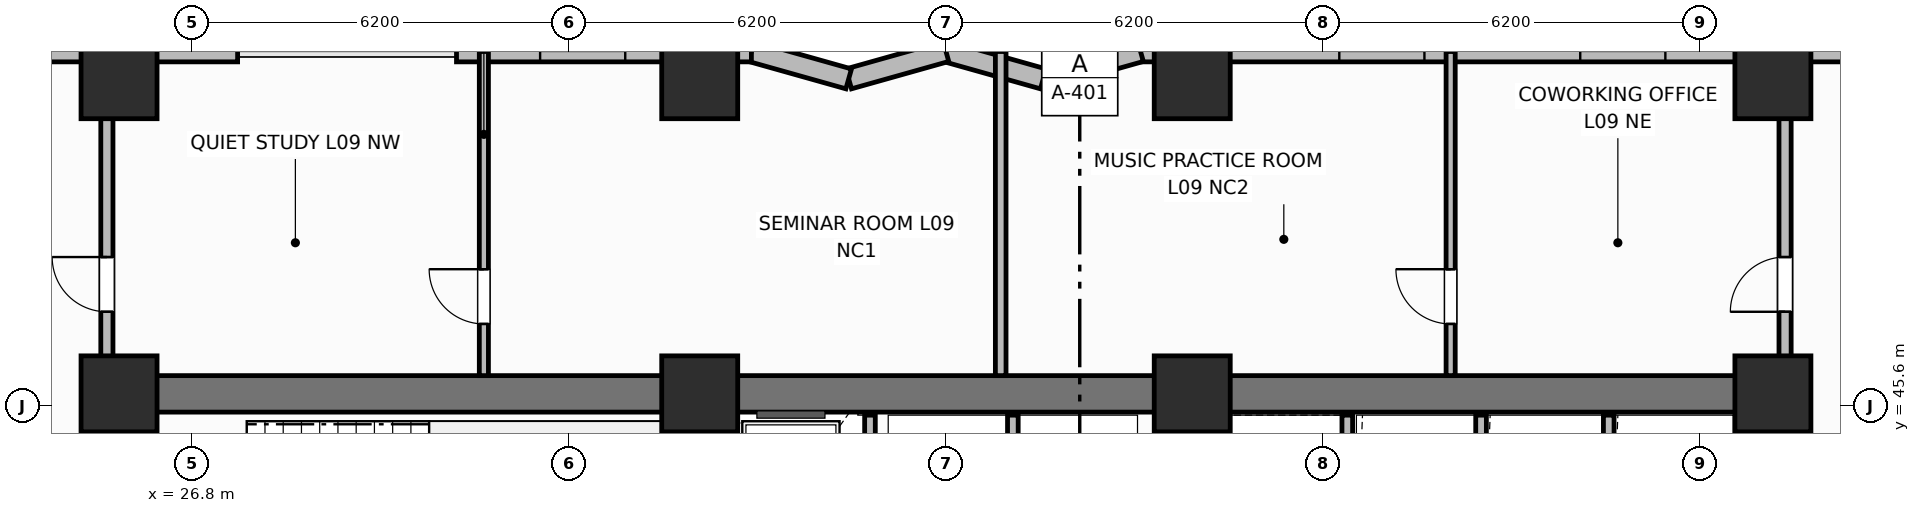
"""IFC4 building model, lengths in metres.
Left out: names, types, materials, properties, quantities, classifications, styles, units other than length and angle.
Written with IfcOpenShell. Run it as: python <this file> out.ifc"""

import sys

from ifc_helpers import new_model, si_unit, direction, frame, frame_2d, origin, origin_2d, place, context, subcontext, project, spatial, rectangle, extrude, element, fill, save


model = new_model("IFC4")
c1 = context("Model", 3, precision=1e-05, world=origin(), true_north=direction((0.0, 1.0)))
c2 = subcontext(c1, "Body", "Model", "MODEL_VIEW")
j1 = project(units=[si_unit("LENGTHUNIT", "METRE"), si_unit("PLANEANGLEUNIT", "RADIAN")], contexts=[c1])
p1 = place(None, origin())
s1 = spatial("IfcSite", under=j1, at=p1, CompositionType="ELEMENT")
p2 = place(p1, origin())
s2 = spatial("IfcBuilding", under=s1, at=p2, CompositionType="ELEMENT")
p3 = place(p2, frame((0.0, 0.0, 39.9)))
s3 = spatial("IfcBuildingStorey", under=s2, at=p3, CompositionType="ELEMENT", Elevation=39.9)
p4 = place(p3, frame((25.6, 45.8, 0.0), z_axis=(0.0, 0.0, 1.0), x_axis=(1.0, 0.0, 0.0)))
e1 = element("IfcWall", 1, at=p4, inside=s3, PredefinedType="SHEAR", context=c2, shape_type="SweptSolid", body=[
    extrude(rectangle(XDim=27.2, YDim=0.6, at=frame_2d((13.6, 0.0))), origin(), (0.0, 0.0, 1.0), 3.7),
])
for number, where, z_axis, x_axis in (
    (2, (25.6, 39.9, 0.0), (0.0, 0.0, 1.0), (0.0, 1.0, 0.0)),
    (3, (52.8, 39.9, 0.0), (0.0, 0.0, 1.0), (0.0, 1.0, 0.0)),
):
    element("IfcWall", number, at=place(p3, frame(where, z_axis=z_axis, x_axis=x_axis)), inside=s3, PredefinedType="SHEAR", context=c2, shape_type="SweptSolid", body=[
        extrude(rectangle(XDim=5.6, YDim=0.6, at=frame_2d((2.8, 0.0))), origin(), (0.0, 0.0, 1.0), 3.7),
    ])
for number, where, z_axis, x_axis in (
    (4, (35.15, 39.9, 0.0), (0.0, 0.0, 1.0), (0.0, 1.0, 0.0)),
    (5, (43.25, 39.9, 0.0), (0.0, 0.0, 1.0), (0.0, 1.0, 0.0)),
):
    element("IfcWall", number, at=place(p3, frame(where, z_axis=z_axis, x_axis=x_axis)), inside=s3, PredefinedType="SHEAR", context=c2, shape_type="SweptSolid", body=[
        extrude(rectangle(XDim=5.6, YDim=0.4, at=frame_2d((2.8, 0.0))), origin(), (0.0, 0.0, 1.0), 3.7),
    ])
for number, where, z_axis, x_axis in (
    (6, (25.6, 45.8, 0.0), (0.0, 0.0, 1.0), (1.0, 0.0, 0.0)),
    (7, (35.15, 45.8, 0.0), (0.0, 0.0, 1.0), (1.0, 0.0, 0.0)),
    (8, (43.25, 45.8, 0.0), (0.0, 0.0, 1.0), (1.0, 0.0, 0.0)),
    (9, (52.8, 45.8, 0.0), (0.0, 0.0, 1.0), (1.0, 0.0, 0.0)),
    (10, (25.6, 50.95, 0.0), (0.0, 0.0, 1.0), (1.0, 0.0, 0.0)),
    (11, (35.15, 50.95, 0.0), (0.0, 0.0, 1.0), (1.0, 0.0, 0.0)),
    (12, (43.25, 50.95, 0.0), (0.0, 0.0, 1.0), (1.0, 0.0, 0.0)),
    (13, (52.8, 50.95, 0.0), (0.0, 0.0, 1.0), (1.0, 0.0, 0.0)),
):
    element("IfcColumn", number, at=place(p3, frame(where, z_axis=z_axis, x_axis=x_axis)), inside=s3, PredefinedType="COLUMN", context=c2, shape_type="SweptSolid", body=[
        extrude(rectangle(XDim=1.25, YDim=1.25, at=origin_2d()), origin(), (0.0, 0.0, 1.0), 3.7),
    ])
p5 = place(p3, frame((55.35, 51.43, 0.0), z_axis=(0.0, 0.0, 1.0), x_axis=(-1.0, 0.0, 0.0)))
e14 = element("IfcWall", 14, at=p5, inside=s3, PredefinedType="SOLIDWALL", context=c2, shape_type="SweptSolid", body=[
    extrude(rectangle(XDim=12.95, YDim=0.34, at=frame_2d((6.475, 0.0))), origin(), (0.0, 0.0, 1.0), 2.7),
])
p6 = place(p5, frame((4.319, 0.0, 0.73)))
e15 = element("IfcOpeningElement", 15, at=p6, cuts=e14, PredefinedType="OPENING", context=c2, shape_type="SweptSolid", body=[
    extrude(rectangle(XDim=1.4, YDim=1.85, at=frame_2d((0.7, 0.925))), frame((0.0, 0.18, 0.0), z_axis=(0.0, -1.0, 0.0), x_axis=(1.0, 0.0, 0.0)), (0.0, 0.0, 1.0), 0.36),
])
p7 = place(p5, frame((8.281, 0.0, 0.73)))
e16 = element("IfcOpeningElement", 16, at=p7, cuts=e14, PredefinedType="OPENING", context=c2, shape_type="SweptSolid", body=[
    extrude(rectangle(XDim=1.4, YDim=1.85, at=frame_2d((0.7, 0.925))), frame((0.0, 0.18, 0.0), z_axis=(0.0, -1.0, 0.0), x_axis=(1.0, 0.0, 0.0)), (0.0, 0.0, 1.0), 0.36),
])
p8 = place(p3, frame((42.4, 51.43, 0.0), z_axis=(0.0, 0.0, 1.0), x_axis=(-0.962652136636, -0.270741322725, 0.0)))
e17 = element("IfcWall", 17, at=p8, inside=s3, PredefinedType="SOLIDWALL", context=c2, shape_type="SweptSolid", body=[
    extrude(rectangle(XDim=1.662, YDim=0.34, at=frame_2d((0.831, 0.0))), origin(), (0.0, 0.0, 1.0), 2.7),
])
p9 = place(p3, frame((40.8, 50.98, 0.0), z_axis=(0.0, 0.0, 1.0), x_axis=(-0.962662902433, 0.270703040766, 0.0)))
e18 = element("IfcWall", 18, at=p9, inside=s3, PredefinedType="SOLIDWALL", context=c2, shape_type="SweptSolid", body=[
    extrude(rectangle(XDim=1.662, YDim=0.34, at=frame_2d((0.831, 0.0))), origin(), (0.0, 0.0, 1.0), 2.7),
])
p10 = place(p3, frame((39.2, 51.43, 0.0), z_axis=(0.0, 0.0, 1.0), x_axis=(-0.962652136636, -0.270741322725, 0.0)))
e19 = element("IfcWall", 19, at=p10, inside=s3, PredefinedType="SOLIDWALL", context=c2, shape_type="SweptSolid", body=[
    extrude(rectangle(XDim=1.662, YDim=0.34, at=frame_2d((0.831, 0.0))), origin(), (0.0, 0.0, 1.0), 2.7),
])
p11 = place(p3, frame((37.6, 50.98, 0.0), z_axis=(0.0, 0.0, 1.0), x_axis=(-0.962662902433, 0.270703040766, 0.0)))
e20 = element("IfcWall", 20, at=p11, inside=s3, PredefinedType="SOLIDWALL", context=c2, shape_type="SweptSolid", body=[
    extrude(rectangle(XDim=1.662, YDim=0.34, at=frame_2d((0.831, 0.0))), origin(), (0.0, 0.0, 1.0), 2.7),
])
p12 = place(p3, frame((36.0, 51.43, 0.0), z_axis=(0.0, 0.0, 1.0), x_axis=(-1.0, 0.0, 0.0)))
e21 = element("IfcWall", 21, at=p12, inside=s3, PredefinedType="SOLIDWALL", context=c2, shape_type="SweptSolid", body=[
    extrude(rectangle(XDim=4.85, YDim=0.34, at=frame_2d((2.425, 0.0))), origin(), (0.0, 0.0, 1.0), 2.7),
])
p13 = place(p12, frame((2.075, 0.0, 0.73)))
e22 = element("IfcOpeningElement", 22, at=p13, cuts=e21, PredefinedType="OPENING", context=c2, shape_type="SweptSolid", body=[
    extrude(rectangle(XDim=1.4, YDim=1.85, at=frame_2d((0.7, 0.925))), frame((0.0, 0.18, 0.0), z_axis=(0.0, -1.0, 0.0), x_axis=(1.0, 0.0, 0.0)), (0.0, 0.0, 1.0), 0.36),
])
p14 = place(p3, frame((27.55, 51.43, 0.0), z_axis=(0.0, 0.0, 1.0), x_axis=(-1.0, 0.0, 0.0)))
e23 = element("IfcWall", 23, at=p14, inside=s3, PredefinedType="SOLIDWALL", context=c2, shape_type="SweptSolid", body=[
    extrude(rectangle(XDim=8.95, YDim=0.34, at=frame_2d((4.475, 0.0))), origin(), (0.0, 0.0, 1.0), 2.7),
])
p15 = place(p14, frame((5.688, 0.0, 0.73)))
e24 = element("IfcOpeningElement", 24, at=p15, cuts=e23, PredefinedType="OPENING", context=c2, shape_type="SweptSolid", body=[
    extrude(rectangle(XDim=1.4, YDim=1.85, at=frame_2d((0.7, 0.925))), frame((0.0, 0.18, 0.0), z_axis=(0.0, -1.0, 0.0), x_axis=(1.0, 0.0, 0.0)), (0.0, 0.0, 1.0), 0.36),
])
p16 = place(p3, frame((37.95, 42.6, 0.0), z_axis=(0.0, 0.0, 1.0), x_axis=(0.0, 1.0, 0.0)))
e25 = element("IfcWall", 25, at=p16, inside=s3, PredefinedType="PARTITIONING", context=c2, shape_type="SweptSolid", body=[
    extrude(rectangle(XDim=2.85, YDim=0.175, at=frame_2d((1.425, 0.0))), origin(), (0.0, 0.0, 1.0), 2.53),
])
for number, where, z_axis, x_axis in (
    (26, (40.3, 42.65, 0.0), (0.0, 0.0, 1.0), (0.0, 1.0, 0.0)),
    (27, (45.8, 42.65, 0.0), (0.0, 0.0, 1.0), (0.0, 1.0, 0.0)),
    (28, (48.0, 42.65, 0.0), (0.0, 0.0, 1.0), (0.0, 1.0, 0.0)),
    (29, (50.1, 42.65, 0.0), (0.0, 0.0, 1.0), (0.0, 1.0, 0.0)),
):
    element("IfcWall", number, at=place(p3, frame(where, z_axis=z_axis, x_axis=x_axis)), inside=s3, PredefinedType="PARTITIONING", context=c2, shape_type="SweptSolid", body=[
        extrude(rectangle(XDim=2.8, YDim=0.175, at=frame_2d((1.4, 0.0))), origin(), (0.0, 0.0, 1.0), 2.53),
    ])
p17 = place(p3, frame((31.6, 46.1, 0.0), z_axis=(0.0, 0.0, 1.0), x_axis=(0.0, 1.0, 0.0)))
e30 = element("IfcWall", 30, at=p17, inside=s3, PredefinedType="PARTITIONING", context=c2, shape_type="SweptSolid", body=[
    extrude(rectangle(XDim=5.33, YDim=0.15, at=frame_2d((2.665, 0.0))), origin(), (0.0, 0.0, 1.0), 2.53),
])
p18 = place(p17, frame((0.85, 0.0, 0.0)))
e31 = element("IfcOpeningElement", 31, at=p18, cuts=e30, PredefinedType="OPENING", context=c2, shape_type="SweptSolid", body=[
    extrude(rectangle(XDim=0.9, YDim=2.1, at=frame_2d((0.45, 1.05))), frame((0.0, 0.085, 0.0), z_axis=(0.0, -1.0, 0.0), x_axis=(1.0, 0.0, 0.0)), (0.0, 0.0, 1.0), 0.17),
])
p19 = place(p3, frame((40.1, 46.1, 0.0), z_axis=(0.0, 0.0, 1.0), x_axis=(0.0, 1.0, 0.0)))
e32 = element("IfcWall", 32, at=p19, inside=s3, PredefinedType="PARTITIONING", context=c2, shape_type="SweptSolid", body=[
    extrude(rectangle(XDim=5.33, YDim=0.175, at=frame_2d((2.665, 0.0))), origin(), (0.0, 0.0, 1.0), 2.53),
])
p20 = place(p3, frame((47.5, 46.1, 0.0), z_axis=(0.0, 0.0, 1.0), x_axis=(0.0, 1.0, 0.0)))
e33 = element("IfcWall", 33, at=p20, inside=s3, PredefinedType="PARTITIONING", context=c2, shape_type="SweptSolid", body=[
    extrude(rectangle(XDim=5.33, YDim=0.15, at=frame_2d((2.665, 0.0))), origin(), (0.0, 0.0, 1.0), 2.53),
])
p21 = place(p20, frame((0.85, 0.0, 0.0)))
e34 = element("IfcOpeningElement", 34, at=p21, cuts=e33, PredefinedType="OPENING", context=c2, shape_type="SweptSolid", body=[
    extrude(rectangle(XDim=0.9, YDim=2.1, at=frame_2d((0.45, 1.05))), frame((0.0, 0.085, 0.0), z_axis=(0.0, -1.0, 0.0), x_axis=(1.0, 0.0, 0.0)), (0.0, 0.0, 1.0), 0.17),
])
p22 = place(p3, frame((25.4, 46.1, 0.0), z_axis=(0.0, 0.0, 1.0), x_axis=(0.0, 1.0, 0.0)))
e35 = element("IfcWall", 35, at=p22, inside=s3, PredefinedType="PARTITIONING", context=c2, shape_type="SweptSolid", body=[
    extrude(rectangle(XDim=4.38, YDim=0.2, at=frame_2d((2.19, 0.0))), origin(), (0.0, 0.0, 1.0), 2.53),
])
p23 = place(p22, frame((1.05, 0.0, 0.0)))
e36 = element("IfcOpeningElement", 36, at=p23, cuts=e35, PredefinedType="OPENING", context=c2, shape_type="SweptSolid", body=[
    extrude(rectangle(XDim=0.9, YDim=2.1, at=frame_2d((0.45, 1.05))), frame((0.0, 0.11, 0.0), z_axis=(0.0, -1.0, 0.0), x_axis=(1.0, 0.0, 0.0)), (0.0, 0.0, 1.0), 0.22),
])
p24 = place(p3, frame((53.0, 46.1, 0.0), z_axis=(0.0, 0.0, 1.0), x_axis=(0.0, 1.0, 0.0)))
e37 = element("IfcWall", 37, at=p24, inside=s3, PredefinedType="PARTITIONING", context=c2, shape_type="SweptSolid", body=[
    extrude(rectangle(XDim=4.38, YDim=0.2, at=frame_2d((2.19, 0.0))), origin(), (0.0, 0.0, 1.0), 2.53),
])
p25 = place(p24, frame((1.05, 0.0, 0.0)))
e38 = element("IfcOpeningElement", 38, at=p25, cuts=e37, PredefinedType="OPENING", context=c2, shape_type="SweptSolid", body=[
    extrude(rectangle(XDim=0.9, YDim=2.1, at=frame_2d((0.45, 1.05))), frame((0.0, 0.11, 0.0), z_axis=(0.0, -1.0, 0.0), x_axis=(1.0, 0.0, 0.0)), (0.0, 0.0, 1.0), 0.22),
])
p26 = place(p6, origin())
e39 = element("IfcWindow", 39, at=p26, inside=s3, PartitioningType="SINGLE_PANEL", PredefinedType="WINDOW", context=c2, shape_type="SweptSolid", body=[
    extrude(rectangle(XDim=1.4, YDim=1.85, at=frame_2d((0.7, 0.925))), frame((0.0, 0.03, 0.0), z_axis=(0.0, -1.0, 0.0), x_axis=(1.0, 0.0, 0.0)), (0.0, 0.0, 1.0), 0.06),
])
fill(e15, e39)
p27 = place(p7, origin())
e40 = element("IfcWindow", 40, at=p27, inside=s3, PartitioningType="SINGLE_PANEL", PredefinedType="WINDOW", context=c2, shape_type="SweptSolid", body=[
    extrude(rectangle(XDim=1.4, YDim=1.85, at=frame_2d((0.7, 0.925))), frame((0.0, 0.03, 0.0), z_axis=(0.0, -1.0, 0.0), x_axis=(1.0, 0.0, 0.0)), (0.0, 0.0, 1.0), 0.06),
])
fill(e16, e40)
p28 = place(p13, origin())
e41 = element("IfcWindow", 41, at=p28, inside=s3, PartitioningType="SINGLE_PANEL", PredefinedType="WINDOW", context=c2, shape_type="SweptSolid", body=[
    extrude(rectangle(XDim=1.4, YDim=1.85, at=frame_2d((0.7, 0.925))), frame((0.0, 0.03, 0.0), z_axis=(0.0, -1.0, 0.0), x_axis=(1.0, 0.0, 0.0)), (0.0, 0.0, 1.0), 0.06),
])
fill(e22, e41)
p29 = place(p18, origin())
e42 = element("IfcDoor", 42, at=p29, inside=s3, OperationType="SINGLE_SWING_RIGHT", PredefinedType="DOOR", context=c2, shape_type="SweptSolid", body=[
    extrude(rectangle(XDim=0.9, YDim=2.1, at=frame_2d((0.45, 1.05))), frame((0.0, 0.025, 0.0), z_axis=(0.0, -1.0, 0.0), x_axis=(1.0, 0.0, 0.0)), (0.0, 0.0, 1.0), 0.05),
])
fill(e31, e42)
p30 = place(p21, origin())
e43 = element("IfcDoor", 43, at=p30, inside=s3, OperationType="SINGLE_SWING_RIGHT", PredefinedType="DOOR", context=c2, shape_type="SweptSolid", body=[
    extrude(rectangle(XDim=0.9, YDim=2.1, at=frame_2d((0.45, 1.05))), frame((0.0, 0.025, 0.0), z_axis=(0.0, -1.0, 0.0), x_axis=(1.0, 0.0, 0.0)), (0.0, 0.0, 1.0), 0.05),
])
fill(e34, e43)
p31 = place(p23, origin())
e44 = element("IfcDoor", 44, at=p31, inside=s3, OperationType="SINGLE_SWING_RIGHT", PredefinedType="DOOR", context=c2, shape_type="SweptSolid", body=[
    extrude(rectangle(XDim=0.9, YDim=2.1, at=frame_2d((0.45, 1.05))), frame((0.0, 0.025, 0.0), z_axis=(0.0, -1.0, 0.0), x_axis=(1.0, 0.0, 0.0)), (0.0, 0.0, 1.0), 0.05),
])
fill(e36, e44)
p32 = place(p25, origin())
e45 = element("IfcDoor", 45, at=p32, inside=s3, OperationType="SINGLE_SWING_LEFT", PredefinedType="DOOR", context=c2, shape_type="SweptSolid", body=[
    extrude(rectangle(XDim=0.9, YDim=2.1, at=frame_2d((0.45, 1.05))), frame((0.0, 0.025, 0.0), z_axis=(0.0, -1.0, 0.0), x_axis=(1.0, 0.0, 0.0)), (0.0, 0.0, 1.0), 0.05),
])
fill(e38, e45)
save(model, sys.argv[1])
